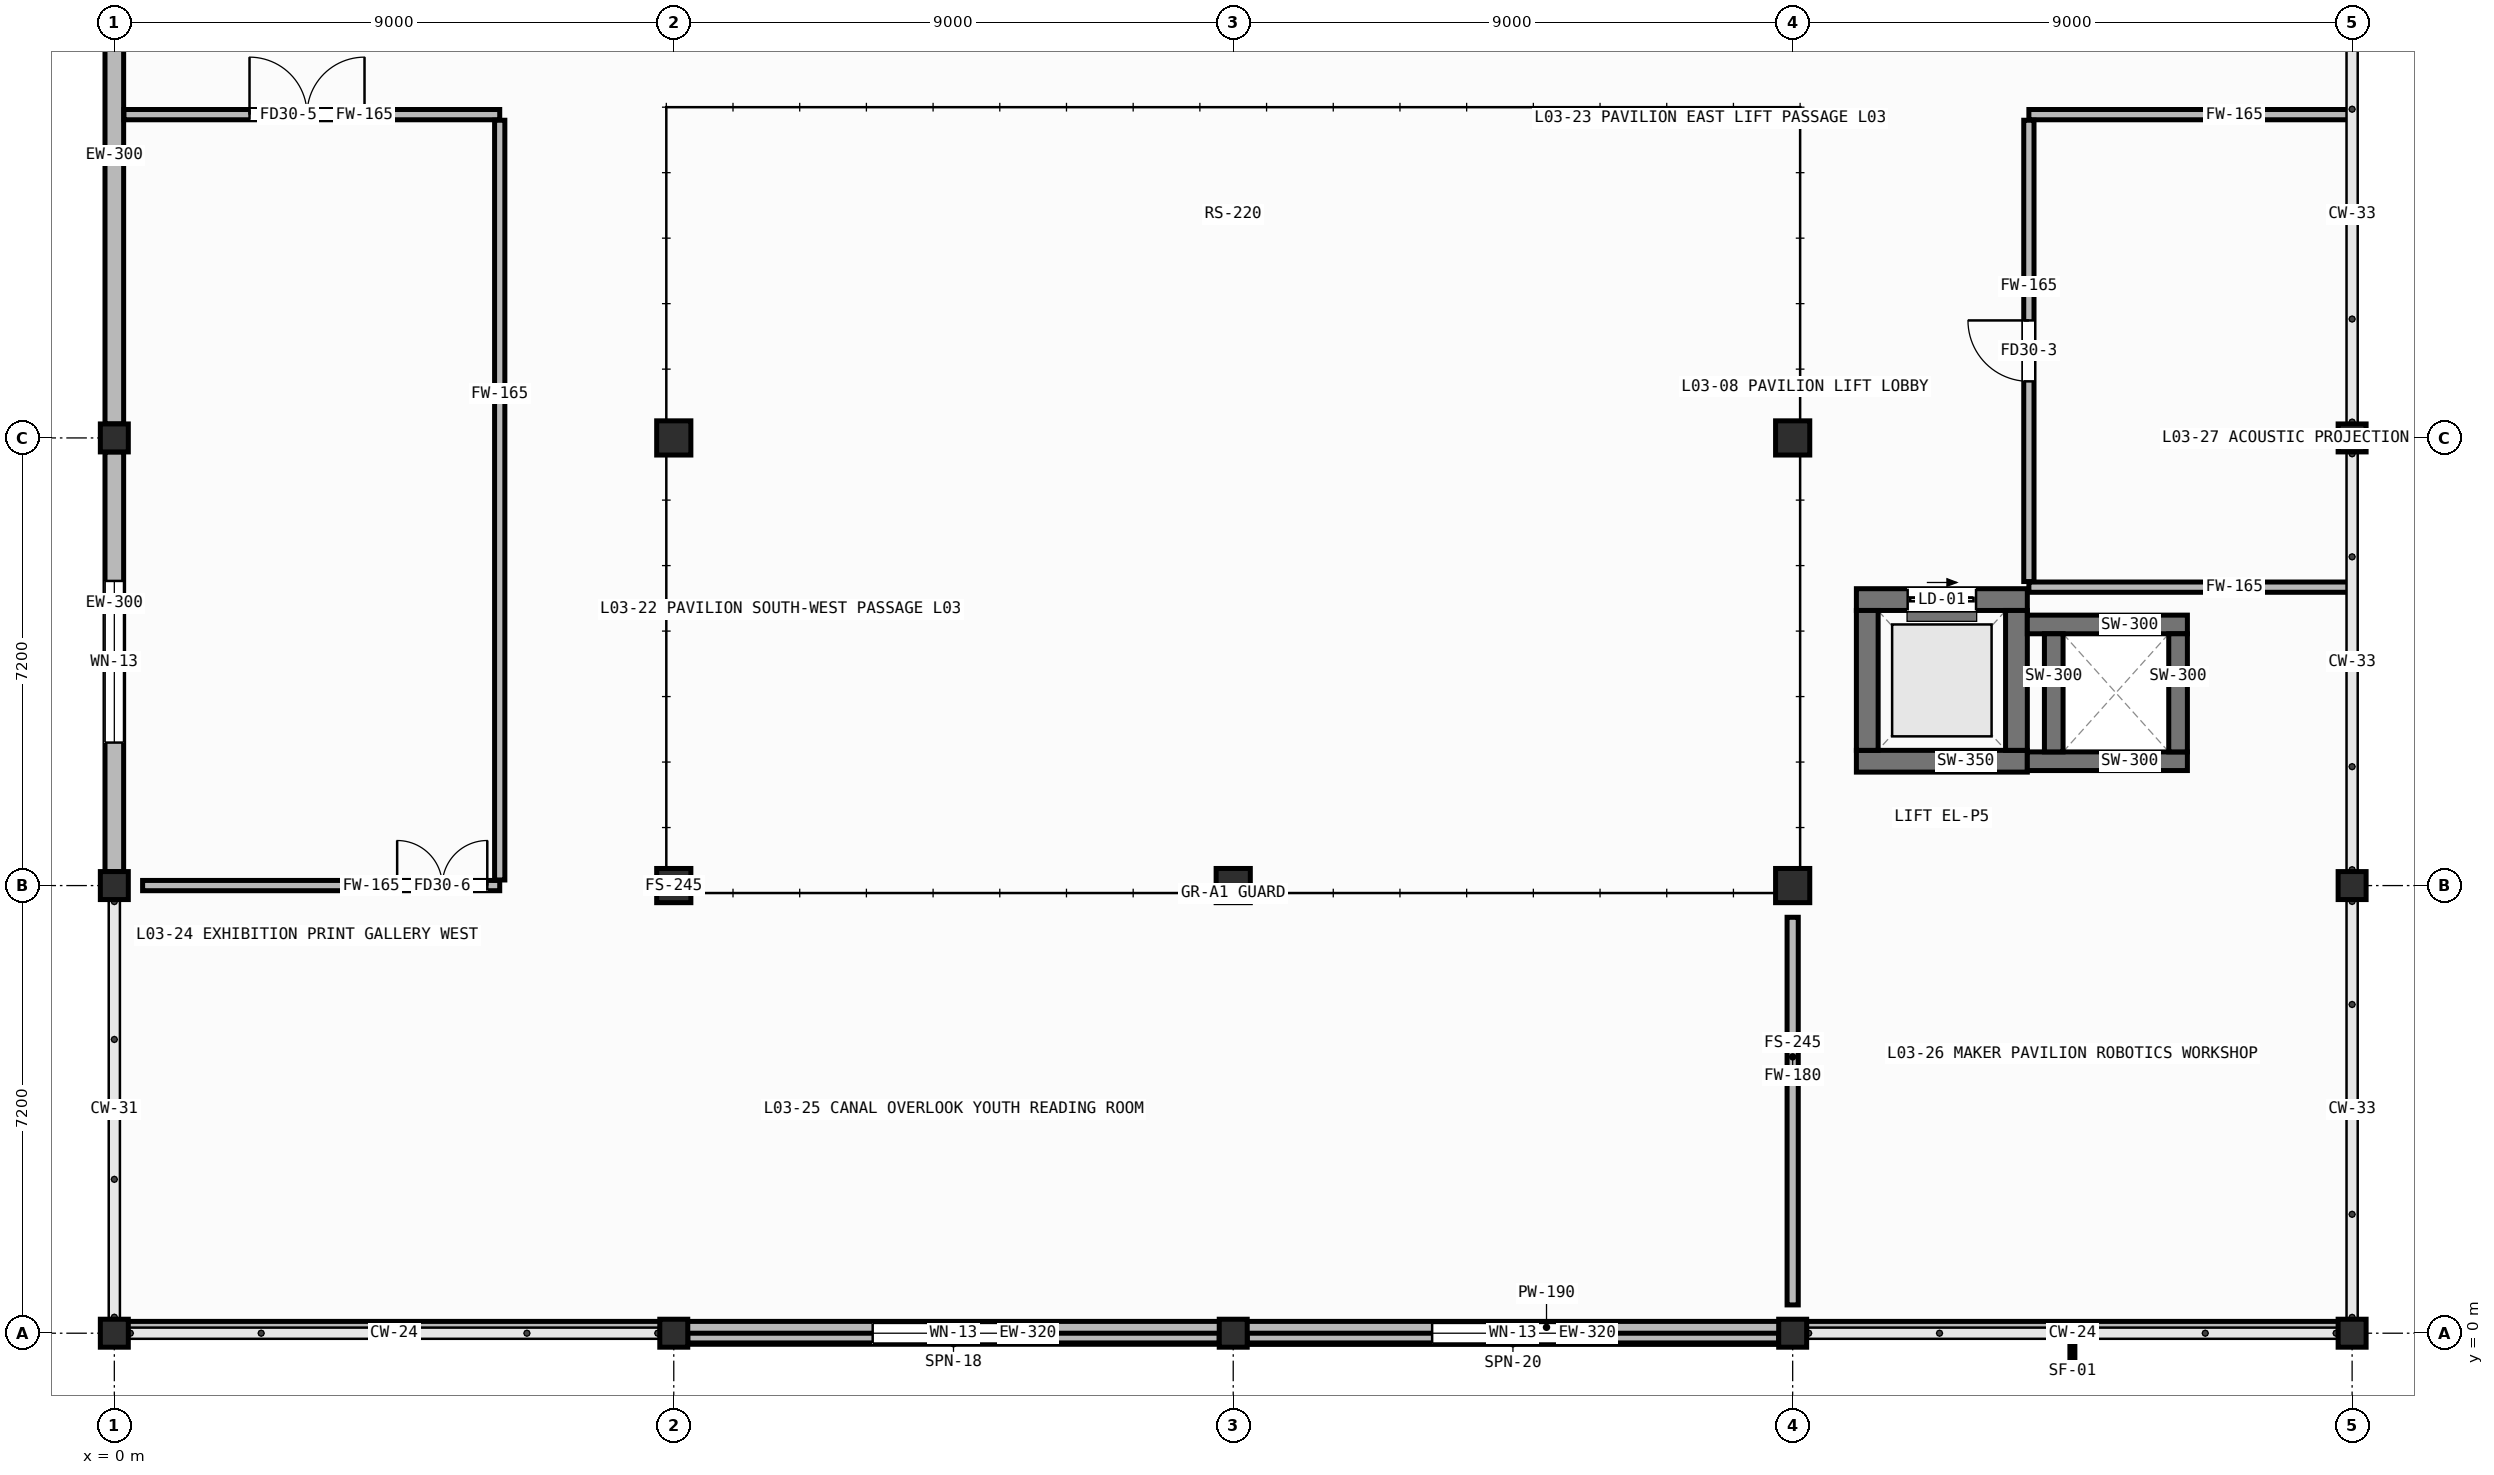
"""IFC4 building model, lengths in metres.
Left out: names, types, materials, properties, quantities, classifications, styles, units other than length and angle.
Written with IfcOpenShell. Run it as: python <this file> out.ifc"""

import sys

from ifc_helpers import new_model, si_unit, direction, frame, frame_2d, origin, origin_2d, place, context, subcontext, project, spatial, rectangle, hollow_rectangle, extrude, element, fill, save


model = new_model("IFC4")
c1 = context("Model", 3, precision=1e-05, world=origin(), true_north=direction((0.0, 1.0)))
c2 = subcontext(c1, "Body", "Model", "MODEL_VIEW")
j1 = project(units=[si_unit("LENGTHUNIT", "METRE"), si_unit("PLANEANGLEUNIT", "RADIAN")], contexts=[c1])
p1 = place(None, origin())
s1 = spatial("IfcSite", under=j1, at=p1, CompositionType="ELEMENT")
p2 = place(p1, origin())
s2 = spatial("IfcBuilding", under=s1, at=p2, CompositionType="ELEMENT")
p3 = place(p2, frame((0.0, 0.0, 8.8)))
s3 = spatial("IfcBuildingStorey", under=s2, at=p3, CompositionType="ELEMENT", Elevation=8.8)
for number, where, z_axis, x_axis in (
    (1, (0.0, 0.0, 0.0), (0.0, 0.0, 1.0), (1.0, 0.0, 0.0)),
    (2, (0.0, 7.2, 0.0), (0.0, 0.0, 1.0), (1.0, 0.0, 0.0)),
    (3, (0.0, 14.4, 0.0), (0.0, 0.0, 1.0), (1.0, 0.0, 0.0)),
    (4, (9.0, 0.0, 0.0), (0.0, 0.0, 1.0), (1.0, 0.0, 0.0)),
):
    element("IfcColumn", number, at=place(p3, frame(where, z_axis=z_axis, x_axis=x_axis)), inside=s3, PredefinedType="COLUMN", context=c2, shape_type="SweptSolid", body=[
        extrude(hollow_rectangle(XDim=0.45, YDim=0.45, WallThickness=0.019, at=origin_2d()), origin(), (0.0, 0.0, 1.0), 3.58),
    ])
for number, where, z_axis, x_axis in (
    (5, (9.0, 7.2, 0.0), (0.0, 0.0, 1.0), (1.0, 0.0, 0.0)),
    (6, (9.0, 14.4, 0.0), (0.0, 0.0, 1.0), (1.0, 0.0, 0.0)),
):
    element("IfcColumn", number, at=place(p3, frame(where, z_axis=z_axis, x_axis=x_axis)), inside=s3, PredefinedType="COLUMN", context=c2, shape_type="SweptSolid", body=[
        extrude(hollow_rectangle(XDim=0.55, YDim=0.55, WallThickness=0.022, at=origin_2d()), origin(), (0.0, 0.0, 1.0), 3.58),
    ])
p4 = place(p3, frame((18.0, 0.0, 0.0), z_axis=(0.0, 0.0, 1.0), x_axis=(1.0, 0.0, 0.0)))
e7 = element("IfcColumn", 7, at=p4, inside=s3, PredefinedType="COLUMN", context=c2, shape_type="SweptSolid", body=[
    extrude(hollow_rectangle(XDim=0.45, YDim=0.45, WallThickness=0.019, at=origin_2d()), origin(), (0.0, 0.0, 1.0), 3.58),
])
p5 = place(p3, frame((18.0, 7.2, 0.0), z_axis=(0.0, 0.0, 1.0), x_axis=(1.0, 0.0, 0.0)))
e8 = element("IfcColumn", 8, at=p5, inside=s3, PredefinedType="COLUMN", context=c2, shape_type="SweptSolid", body=[
    extrude(hollow_rectangle(XDim=0.55, YDim=0.55, WallThickness=0.022, at=origin_2d()), origin(), (0.0, 0.0, 1.0), 3.58),
])
p6 = place(p3, frame((27.0, 0.0, 0.0), z_axis=(0.0, 0.0, 1.0), x_axis=(1.0, 0.0, 0.0)))
e9 = element("IfcColumn", 9, at=p6, inside=s3, PredefinedType="COLUMN", context=c2, shape_type="SweptSolid", body=[
    extrude(hollow_rectangle(XDim=0.45, YDim=0.45, WallThickness=0.019, at=origin_2d()), origin(), (0.0, 0.0, 1.0), 3.58),
])
for number, where, z_axis, x_axis in (
    (10, (27.0, 7.2, 0.0), (0.0, 0.0, 1.0), (1.0, 0.0, 0.0)),
    (11, (27.0, 14.4, 0.0), (0.0, 0.0, 1.0), (1.0, 0.0, 0.0)),
):
    element("IfcColumn", number, at=place(p3, frame(where, z_axis=z_axis, x_axis=x_axis)), inside=s3, PredefinedType="COLUMN", context=c2, shape_type="SweptSolid", body=[
        extrude(hollow_rectangle(XDim=0.55, YDim=0.55, WallThickness=0.022, at=origin_2d()), origin(), (0.0, 0.0, 1.0), 3.58),
    ])
for number, where, z_axis, x_axis in (
    (12, (36.0, 0.0, 0.0), (0.0, 0.0, 1.0), (1.0, 0.0, 0.0)),
    (13, (36.0, 7.2, 0.0), (0.0, 0.0, 1.0), (1.0, 0.0, 0.0)),
    (14, (36.0, 14.4, 0.0), (0.0, 0.0, 1.0), (1.0, 0.0, 0.0)),
):
    element("IfcColumn", number, at=place(p3, frame(where, z_axis=z_axis, x_axis=x_axis)), inside=s3, PredefinedType="COLUMN", context=c2, shape_type="SweptSolid", body=[
        extrude(hollow_rectangle(XDim=0.45, YDim=0.45, WallThickness=0.019, at=origin_2d()), origin(), (0.0, 0.0, 1.0), 3.58),
    ])
p7 = place(p3, frame((9.225, 0.0, 0.0), z_axis=(0.0, 0.0, 1.0), x_axis=(1.0, 0.0, 0.0)))
e15 = element("IfcWall", 15, at=p7, inside=s3, PredefinedType="STANDARD", context=c2, shape_type="SweptSolid", body=[
    extrude(rectangle(XDim=8.55, YDim=0.32, at=frame_2d((4.275, 0.0))), origin(), (0.0, 0.0, 1.0), 3.13),
])
p8 = place(p7, frame((2.975, 0.0, 0.85)))
e16 = element("IfcOpeningElement", 16, at=p8, cuts=e15, PredefinedType="OPENING", context=c2, shape_type="SweptSolid", body=[
    extrude(rectangle(XDim=2.6, YDim=1.6, at=frame_2d((1.3, 0.8))), frame((0.0, 0.172, 0.0), z_axis=(0.0, -1.0, 0.0), x_axis=(1.0, 0.0, 0.0)), (0.0, 0.0, 1.0), 0.344),
])
p9 = place(p3, frame((18.225, 0.0, 0.0), z_axis=(0.0, 0.0, 1.0), x_axis=(1.0, 0.0, 0.0)))
e17 = element("IfcWall", 17, at=p9, inside=s3, PredefinedType="STANDARD", context=c2, shape_type="SweptSolid", body=[
    extrude(rectangle(XDim=8.55, YDim=0.32, at=frame_2d((4.275, 0.0))), origin(), (0.0, 0.0, 1.0), 3.13),
])
p10 = place(p9, frame((2.975, 0.0, 0.85)))
e18 = element("IfcOpeningElement", 18, at=p10, cuts=e17, PredefinedType="OPENING", context=c2, shape_type="SweptSolid", body=[
    extrude(rectangle(XDim=2.6, YDim=1.6, at=frame_2d((1.3, 0.8))), frame((0.0, 0.172, 0.0), z_axis=(0.0, -1.0, 0.0), x_axis=(1.0, 0.0, 0.0)), (0.0, 0.0, 1.0), 0.344),
])
p11 = place(p3, frame((0.0, 7.425, 0.0), z_axis=(0.0, 0.0, 1.0), x_axis=(0.0, 1.0, 0.0)))
e19 = element("IfcWall", 19, at=p11, inside=s3, PredefinedType="STANDARD", context=c2, shape_type="SweptSolid", body=[
    extrude(rectangle(XDim=6.75, YDim=0.3, at=frame_2d((3.375, 0.0))), origin(), (0.0, 0.0, 1.0), 3.13),
])
p12 = place(p11, frame((2.075, 0.0, 0.85)))
e20 = element("IfcOpeningElement", 20, at=p12, cuts=e19, PredefinedType="OPENING", context=c2, shape_type="SweptSolid", body=[
    extrude(rectangle(XDim=2.6, YDim=1.6, at=frame_2d((1.3, 0.8))), frame((0.0, 0.162, 0.0), z_axis=(0.0, -1.0, 0.0), x_axis=(1.0, 0.0, 0.0)), (0.0, 0.0, 1.0), 0.324),
])
p13 = place(p3, frame((0.0, 14.625, 0.0), z_axis=(0.0, 0.0, 1.0), x_axis=(0.0, 1.0, 0.0)))
e21 = element("IfcWall", 21, at=p13, inside=s3, PredefinedType="STANDARD", context=c2, shape_type="SweptSolid", body=[
    extrude(rectangle(XDim=6.75, YDim=0.3, at=frame_2d((3.375, 0.0))), origin(), (0.0, 0.0, 1.0), 3.13),
])
p14 = place(p3, frame((0.0, 0.095, 3.8), z_axis=(0.0, 0.0, 1.0), x_axis=(1.0, 0.0, 0.0)))
e22 = element("IfcWall", 22, at=p14, inside=s3, PredefinedType="PARAPET", context=c2, shape_type="SweptSolid", body=[
    extrude(rectangle(XDim=36.0, YDim=0.19, at=frame_2d((18.0, 0.0))), origin(), (0.0, 0.0, 1.0), 0.7),
])
p15 = place(p3, frame((28.025, 9.2, 0.0), z_axis=(0.0, 0.0, 1.0), x_axis=(1.0, 0.0, 0.0)))
e23 = element("IfcWall", 23, at=p15, inside=s3, PredefinedType="SHEAR", context=c2, shape_type="SweptSolid", body=[
    extrude(rectangle(XDim=2.75, YDim=0.35, at=frame_2d((1.375, 0.0))), origin(), (0.0, 0.0, 1.0), 3.58),
])
p16 = place(p3, frame((28.025, 11.8, 0.0), z_axis=(0.0, 0.0, 1.0), x_axis=(1.0, 0.0, 0.0)))
e24 = element("IfcWall", 24, at=p16, inside=s3, PredefinedType="SHEAR", context=c2, shape_type="SweptSolid", body=[
    extrude(rectangle(XDim=2.75, YDim=0.35, at=frame_2d((1.375, 0.0))), origin(), (0.0, 0.0, 1.0), 3.58),
])
p17 = place(p16, frame((0.825, 0.0, 0.0)))
e25 = element("IfcOpeningElement", 25, at=p17, cuts=e24, PredefinedType="OPENING", context=c2, shape_type="SweptSolid", body=[
    extrude(rectangle(XDim=1.1, YDim=2.1, at=frame_2d((0.55, 1.05))), frame((0.0, 0.187, 0.0), z_axis=(0.0, -1.0, 0.0), x_axis=(1.0, 0.0, 0.0)), (0.0, 0.0, 1.0), 0.374),
])
for number, where, z_axis, x_axis in (
    (26, (28.2, 9.375, 0.0), (0.0, 0.0, 1.0), (0.0, 1.0, 0.0)),
    (27, (30.6, 9.375, 0.0), (0.0, 0.0, 1.0), (0.0, 1.0, 0.0)),
):
    element("IfcWall", number, at=place(p3, frame(where, z_axis=z_axis, x_axis=x_axis)), inside=s3, PredefinedType="SHEAR", context=c2, shape_type="SweptSolid", body=[
        extrude(rectangle(XDim=2.25, YDim=0.35, at=frame_2d((1.125, 0.0))), origin(), (0.0, 0.0, 1.0), 3.58),
    ])
for number, where, z_axis, x_axis in (
    (28, (30.775, 9.2, 0.0), (0.0, 0.0, 1.0), (1.0, 0.0, 0.0)),
    (29, (30.775, 11.4, 0.0), (0.0, 0.0, 1.0), (1.0, 0.0, 0.0)),
):
    element("IfcWall", number, at=place(p3, frame(where, z_axis=z_axis, x_axis=x_axis)), inside=s3, PredefinedType="SHEAR", context=c2, shape_type="SweptSolid", body=[
        extrude(rectangle(XDim=2.575, YDim=0.3, at=frame_2d((1.288, 0.0))), origin(), (0.0, 0.0, 1.0), 3.58),
    ])
for number, where, z_axis, x_axis in (
    (30, (31.2, 9.35, 0.0), (0.0, 0.0, 1.0), (0.0, 1.0, 0.0)),
    (31, (33.2, 9.35, 0.0), (0.0, 0.0, 1.0), (0.0, 1.0, 0.0)),
):
    element("IfcWall", number, at=place(p3, frame(where, z_axis=z_axis, x_axis=x_axis)), inside=s3, PredefinedType="SHEAR", context=c2, shape_type="SweptSolid", body=[
        extrude(rectangle(XDim=1.9, YDim=0.3, at=frame_2d((0.95, 0.0))), origin(), (0.0, 0.0, 1.0), 3.58),
    ])
p18 = place(p3, frame((0.455, 7.2, 0.0), z_axis=(0.0, 0.0, 1.0), x_axis=(1.0, 0.0, 0.0)))
e32 = element("IfcWall", 32, at=p18, inside=s3, PredefinedType="PARTITIONING", context=c2, shape_type="SweptSolid", body=[
    extrude(rectangle(XDim=5.745, YDim=0.165, at=frame_2d((2.873, 0.0))), origin(), (0.0, 0.0, 1.0), 2.86),
])
p19 = place(p18, frame((4.095, 0.0, 0.0)))
e33 = element("IfcOpeningElement", 33, at=p19, cuts=e32, PredefinedType="OPENING", context=c2, shape_type="SweptSolid", body=[
    extrude(rectangle(XDim=1.45, YDim=2.1, at=frame_2d((0.725, 1.05))), frame((0.0, 0.094, 0.0), z_axis=(0.0, -1.0, 0.0), x_axis=(1.0, 0.0, 0.0)), (0.0, 0.0, 1.0), 0.189),
])
p20 = place(p3, frame((0.155, 19.6, 0.0), z_axis=(0.0, 0.0, 1.0), x_axis=(1.0, 0.0, 0.0)))
e34 = element("IfcWall", 34, at=p20, inside=s3, PredefinedType="PARTITIONING", context=c2, shape_type="SweptSolid", body=[
    extrude(rectangle(XDim=6.045, YDim=0.165, at=frame_2d((3.022, 0.0))), origin(), (0.0, 0.0, 1.0), 3.58),
])
p21 = place(p20, frame((2.02, 0.0, 0.0)))
e35 = element("IfcOpeningElement", 35, at=p21, cuts=e34, PredefinedType="OPENING", context=c2, shape_type="SweptSolid", body=[
    extrude(rectangle(XDim=1.85, YDim=2.12, at=frame_2d((0.925, 1.06))), frame((0.0, 0.094, 0.0), z_axis=(0.0, -1.0, 0.0), x_axis=(1.0, 0.0, 0.0)), (0.0, 0.0, 1.0), 0.189),
])
p22 = place(p3, frame((6.2, 7.29, 0.0), z_axis=(0.0, 0.0, 1.0), x_axis=(0.0, 1.0, 0.0)))
e36 = element("IfcWall", 36, at=p22, inside=s3, PredefinedType="PARTITIONING", context=c2, shape_type="SweptSolid", body=[
    extrude(rectangle(XDim=12.22, YDim=0.165, at=frame_2d((6.11, 0.0))), origin(), (0.0, 0.0, 1.0), 3.58),
])
p23 = place(p3, frame((27.0, 0.455, 0.0), z_axis=(0.0, 0.0, 1.0), x_axis=(0.0, 1.0, 0.0)))
e37 = element("IfcWall", 37, at=p23, inside=s3, PredefinedType="PARTITIONING", context=c2, shape_type="SweptSolid", body=[
    extrude(rectangle(XDim=6.235, YDim=0.18, at=frame_2d((3.117, 0.0))), origin(), (0.0, 0.0, 1.0), 2.86),
])
for number, where, z_axis, x_axis in (
    (38, (30.8, 12.0, 0.0), (0.0, 0.0, 1.0), (1.0, 0.0, 0.0)),
    (39, (30.8, 19.6, 0.0), (0.0, 0.0, 1.0), (1.0, 0.0, 0.0)),
):
    element("IfcWall", number, at=place(p3, frame(where, z_axis=z_axis, x_axis=x_axis)), inside=s3, PredefinedType="PARTITIONING", context=c2, shape_type="SweptSolid", body=[
        extrude(rectangle(XDim=5.165, YDim=0.165, at=frame_2d((2.583, 0.0))), origin(), (0.0, 0.0, 1.0), 3.58),
    ])
p24 = place(p3, frame((30.8, 12.09, 0.0), z_axis=(0.0, 0.0, 1.0), x_axis=(0.0, 1.0, 0.0)))
e40 = element("IfcWall", 40, at=p24, inside=s3, PredefinedType="PARTITIONING", context=c2, shape_type="SweptSolid", body=[
    extrude(rectangle(XDim=7.42, YDim=0.165, at=frame_2d((3.71, 0.0))), origin(), (0.0, 0.0, 1.0), 3.58),
])
p25 = place(p24, frame((3.22, 0.0, 0.0)))
e41 = element("IfcOpeningElement", 41, at=p25, cuts=e40, PredefinedType="OPENING", context=c2, shape_type="SweptSolid", body=[
    extrude(rectangle(XDim=0.98, YDim=2.02, at=frame_2d((0.49, 1.01))), frame((0.0, 0.094, 0.0), z_axis=(0.0, -1.0, 0.0), x_axis=(1.0, 0.0, 0.0)), (0.0, 0.0, 1.0), 0.189),
])
p26 = place(p8, origin())
e42 = element("IfcWindow", 42, at=p26, inside=s3, PartitioningType="DOUBLE_PANEL_VERTICAL", PredefinedType="WINDOW", context=c2, shape_type="SweptSolid", body=[
    extrude(rectangle(XDim=2.6, YDim=1.6, at=frame_2d((1.3, 0.8))), frame((0.0, 0.03, 0.0), z_axis=(0.0, -1.0, 0.0), x_axis=(1.0, 0.0, 0.0)), (0.0, 0.0, 1.0), 0.06),
])
fill(e16, e42)
p27 = place(p10, origin())
e43 = element("IfcWindow", 43, at=p27, inside=s3, PartitioningType="DOUBLE_PANEL_VERTICAL", PredefinedType="WINDOW", context=c2, shape_type="SweptSolid", body=[
    extrude(rectangle(XDim=2.6, YDim=1.6, at=frame_2d((1.3, 0.8))), frame((0.0, 0.03, 0.0), z_axis=(0.0, -1.0, 0.0), x_axis=(1.0, 0.0, 0.0)), (0.0, 0.0, 1.0), 0.06),
])
fill(e18, e43)
p28 = place(p12, origin())
e44 = element("IfcWindow", 44, at=p28, inside=s3, PartitioningType="DOUBLE_PANEL_VERTICAL", PredefinedType="WINDOW", context=c2, shape_type="SweptSolid", body=[
    extrude(rectangle(XDim=2.6, YDim=1.6, at=frame_2d((1.3, 0.8))), frame((0.0, 0.03, 0.0), z_axis=(0.0, -1.0, 0.0), x_axis=(1.0, 0.0, 0.0)), (0.0, 0.0, 1.0), 0.06),
])
fill(e20, e44)
p29 = place(p17, origin())
e45 = element("IfcDoor", 45, at=p29, inside=s3, OperationType="SLIDING_TO_RIGHT", PredefinedType="DOOR", context=c2, shape_type="SweptSolid", body=[
    extrude(rectangle(XDim=1.1, YDim=2.1, at=frame_2d((0.55, 1.05))), frame((0.0, 0.025, 0.0), z_axis=(0.0, -1.0, 0.0), x_axis=(1.0, 0.0, 0.0)), (0.0, 0.0, 1.0), 0.05),
])
fill(e25, e45)
p30 = place(p21, origin())
e46 = element("IfcDoor", 46, at=p30, inside=s3, OperationType="DOUBLE_DOOR_SINGLE_SWING", PredefinedType="DOOR", context=c2, shape_type="SweptSolid", body=[
    extrude(rectangle(XDim=1.85, YDim=2.12, at=frame_2d((0.925, 1.06))), frame((0.0, 0.025, 0.0), z_axis=(0.0, -1.0, 0.0), x_axis=(1.0, 0.0, 0.0)), (0.0, 0.0, 1.0), 0.05),
])
fill(e35, e46)
p31 = place(p19, origin())
e47 = element("IfcDoor", 47, at=p31, inside=s3, OperationType="DOUBLE_DOOR_SINGLE_SWING", PredefinedType="DOOR", context=c2, shape_type="SweptSolid", body=[
    extrude(rectangle(XDim=1.45, YDim=2.1, at=frame_2d((0.725, 1.05))), frame((0.0, 0.025, 0.0), z_axis=(0.0, -1.0, 0.0), x_axis=(1.0, 0.0, 0.0)), (0.0, 0.0, 1.0), 0.05),
])
fill(e33, e47)
p32 = place(p25, origin())
e48 = element("IfcDoor", 48, at=p32, inside=s3, OperationType="SINGLE_SWING_RIGHT", PredefinedType="DOOR", context=c2, shape_type="SweptSolid", body=[
    extrude(rectangle(XDim=0.98, YDim=2.02, at=frame_2d((0.49, 1.01))), frame((0.0, 0.025, 0.0), z_axis=(0.0, -1.0, 0.0), x_axis=(1.0, 0.0, 0.0)), (0.0, 0.0, 1.0), 0.05),
])
fill(e41, e48)
save(model, sys.argv[1])
